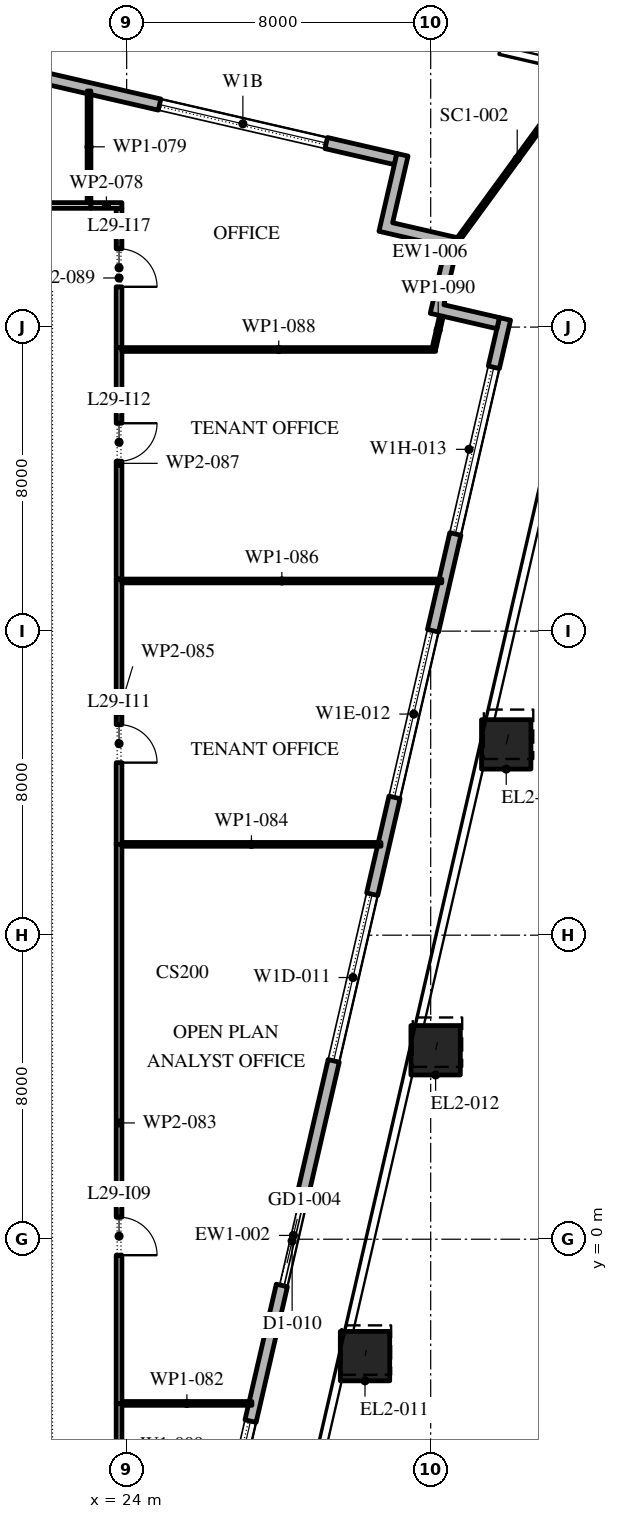
"""IFC4 building model, lengths in metres.
Left out: names, types, materials, properties, quantities, classifications, styles, units other than length and angle.
Written with IfcOpenShell. Run it as: python <this file> out.ifc"""

import sys

from ifc_helpers import new_model, si_unit, direction, frame, frame_2d, origin, origin_2d, place, context, subcontext, project, spatial, polyline, rectangle, outline, extrude, element, fill, save


model = new_model("IFC4")
c1 = context("Model", 3, precision=1e-05, world=origin(), true_north=direction((0.0, 1.0)))
c2 = subcontext(c1, "Body", "Model", "MODEL_VIEW")
j1 = project(units=[si_unit("LENGTHUNIT", "METRE"), si_unit("PLANEANGLEUNIT", "RADIAN")], contexts=[c1])
p1 = place(None, origin())
s1 = spatial("IfcSite", under=j1, at=p1, CompositionType="ELEMENT")
p2 = place(p1, origin())
s2 = spatial("IfcBuilding", under=s1, at=p2, CompositionType="ELEMENT")
p3 = place(p2, frame((0.0, 0.0, 135.0)))
s3 = spatial("IfcBuildingStorey", under=s2, at=p3, CompositionType="ELEMENT", Elevation=135.0)
p4 = place(p3, frame((30.272, -3.076, 0.0), z_axis=(0.008770884695, 0.037929719907, 0.99924191662), x_axis=(-0.974290512438, 0.225295355862, 0.0)))
e1 = element("IfcColumn", 1, at=p4, inside=s3, PredefinedType="COLUMN", context=c2, shape_type="SweptSolid", body=[
    extrude(rectangle(XDim=1.3, YDim=1.3, at=origin_2d()), origin(), (0.0, 0.0, 1.0), 4.203),
])
p5 = place(p3, frame((32.13, 4.972, 0.0), z_axis=(0.011668267153, 0.050562490995, 0.998652735462), x_axis=(-0.974391195695, 0.224859506699, 0.0)))
e2 = element("IfcColumn", 2, at=p5, inside=s3, PredefinedType="COLUMN", context=c2, shape_type="SweptSolid", body=[
    extrude(rectangle(XDim=1.3, YDim=1.3, at=origin_2d()), origin(), (0.0, 0.0, 1.0), 4.206),
])
p6 = place(p3, frame((33.988, 13.02, 0.0), z_axis=(0.014617836866, 0.063111930596, 0.997899395261), x_axis=(-0.974209784844, 0.225644178107, 0.0)))
e3 = element("IfcColumn", 3, at=p6, inside=s3, PredefinedType="COLUMN", context=c2, shape_type="SweptSolid", body=[
    extrude(rectangle(XDim=1.3, YDim=1.3, at=origin_2d()), origin(), (0.0, 0.0, 1.0), 4.209),
])
p7 = place(p3, frame((22.82, -24.016, 0.0), z_axis=(0.0, 0.0, 1.0), x_axis=(0.224953880882, 0.974369412223, 0.0)))
e4 = element("IfcWall", 4, at=p7, inside=s3, PredefinedType="STANDARD", context=c2, shape_type="SweptSolid", body=[
    extrude(rectangle(XDim=49.5, YDim=0.3, at=frame_2d((24.75, 0.0))), origin(), (0.0, 0.0, 1.0), 4.0),
])
p8 = place(p7, frame((1.157, 0.0, 0.45)))
e5 = element("IfcOpeningElement", 5, at=p8, cuts=e4, PredefinedType="OPENING", context=c2, shape_type="SweptSolid", body=[
    extrude(rectangle(XDim=4.5, YDim=3.05, at=frame_2d((2.25, 1.525))), frame((0.0, 0.16, 0.0), z_axis=(0.0, -1.0, 0.0), x_axis=(1.0, 0.0, 0.0)), (0.0, 0.0, 1.0), 0.32),
])
p9 = place(p7, frame((8.121, 0.0, 0.45)))
e6 = element("IfcOpeningElement", 6, at=p9, cuts=e4, PredefinedType="OPENING", context=c2, shape_type="SweptSolid", body=[
    extrude(rectangle(XDim=4.5, YDim=3.05, at=frame_2d((2.25, 1.525))), frame((0.0, 0.16, 0.0), z_axis=(0.0, -1.0, 0.0), x_axis=(1.0, 0.0, 0.0)), (0.0, 0.0, 1.0), 0.32),
])
p10 = place(p7, frame((15.236, 0.0, 0.45)))
e7 = element("IfcOpeningElement", 7, at=p10, cuts=e4, PredefinedType="OPENING", context=c2, shape_type="SweptSolid", body=[
    extrude(rectangle(XDim=4.5, YDim=3.05, at=frame_2d((2.25, 1.525))), frame((0.0, 0.16, 0.0), z_axis=(0.0, -1.0, 0.0), x_axis=(1.0, 0.0, 0.0)), (0.0, 0.0, 1.0), 0.32),
])
p11 = place(p7, frame((23.4, 0.0, 0.0)))
e8 = element("IfcOpeningElement", 8, at=p11, cuts=e4, PredefinedType="OPENING", context=c2, shape_type="SweptSolid", body=[
    extrude(rectangle(XDim=2.4, YDim=3.5, at=frame_2d((1.2, 1.75))), frame((0.0, 0.16, 0.0), z_axis=(0.0, -1.0, 0.0), x_axis=(1.0, 0.0, 0.0)), (0.0, 0.0, 1.0), 0.32),
])
p12 = place(p7, frame((29.464, 0.0, 0.45)))
e9 = element("IfcOpeningElement", 9, at=p12, cuts=e4, PredefinedType="OPENING", context=c2, shape_type="SweptSolid", body=[
    extrude(rectangle(XDim=4.5, YDim=2.875, at=frame_2d((2.25, 1.438))), frame((0.0, 0.16, 0.0), z_axis=(0.0, -1.0, 0.0), x_axis=(1.0, 0.0, 0.0)), (0.0, 0.0, 1.0), 0.32),
])
p13 = place(p7, frame((36.579, 0.0, 0.45)))
e10 = element("IfcOpeningElement", 10, at=p13, cuts=e4, PredefinedType="OPENING", context=c2, shape_type="SweptSolid", body=[
    extrude(rectangle(XDim=4.5, YDim=2.825, at=frame_2d((2.25, 1.413))), frame((0.0, 0.16, 0.0), z_axis=(0.0, -1.0, 0.0), x_axis=(1.0, 0.0, 0.0)), (0.0, 0.0, 1.0), 0.32),
])
p14 = place(p7, frame((43.693, 0.0, 0.45)))
e11 = element("IfcOpeningElement", 11, at=p14, cuts=e4, PredefinedType="OPENING", context=c2, shape_type="SweptSolid", body=[
    extrude(rectangle(XDim=4.5, YDim=2.75, at=frame_2d((2.25, 1.375))), frame((0.0, 0.16, 0.0), z_axis=(0.0, -1.0, 0.0), x_axis=(1.0, 0.0, 0.0)), (0.0, 0.0, 1.0), 0.32),
])
p15 = place(p3, frame((31.078, 28.421, 0.0), z_axis=(0.0, 0.0, 1.0), x_axis=(-0.974370456532, 0.224949357493, 0.0)))
e12 = element("IfcWall", 12, at=p15, inside=s3, PredefinedType="STANDARD", context=c2, shape_type="SweptSolid", body=[
    extrude(rectangle(XDim=51.0, YDim=0.3, at=frame_2d((25.5, 0.0))), origin(), (0.0, 0.0, 1.0), 4.0),
])
p16 = place(p15, frame((1.875, 0.0, 0.45)))
e13 = element("IfcOpeningElement", 13, at=p16, cuts=e12, PredefinedType="OPENING", context=c2, shape_type="SweptSolid", body=[
    extrude(rectangle(XDim=4.5, YDim=2.95, at=frame_2d((2.25, 1.475))), frame((0.0, 0.16, 0.0), z_axis=(0.0, -1.0, 0.0), x_axis=(1.0, 0.0, 0.0)), (0.0, 0.0, 1.0), 0.32),
])
p17 = place(p15, frame((10.275, 0.0, 0.45)))
e14 = element("IfcOpeningElement", 14, at=p17, cuts=e12, PredefinedType="OPENING", context=c2, shape_type="SweptSolid", body=[
    extrude(rectangle(XDim=4.5, YDim=2.825, at=frame_2d((2.25, 1.413))), frame((0.0, 0.16, 0.0), z_axis=(0.0, -1.0, 0.0), x_axis=(1.0, 0.0, 0.0)), (0.0, 0.0, 1.0), 0.32),
])
p18 = place(p15, frame((18.825, 0.0, 0.45)))
e15 = element("IfcOpeningElement", 15, at=p18, cuts=e12, PredefinedType="OPENING", context=c2, shape_type="SweptSolid", body=[
    extrude(rectangle(XDim=4.5, YDim=2.75, at=frame_2d((2.25, 1.375))), frame((0.0, 0.16, 0.0), z_axis=(0.0, -1.0, 0.0), x_axis=(1.0, 0.0, 0.0)), (0.0, 0.0, 1.0), 0.32),
])
p19 = place(p15, frame((27.075, 0.0, 0.0)))
e16 = element("IfcOpeningElement", 16, at=p19, cuts=e12, PredefinedType="OPENING", context=c2, shape_type="SweptSolid", body=[
    extrude(rectangle(XDim=2.4, YDim=3.125, at=frame_2d((1.2, 1.562))), frame((0.0, 0.16, 0.0), z_axis=(0.0, -1.0, 0.0), x_axis=(1.0, 0.0, 0.0)), (0.0, 0.0, 1.0), 0.32),
])
p20 = place(p15, frame((35.925, 0.0, 0.45)))
e17 = element("IfcOpeningElement", 17, at=p20, cuts=e12, PredefinedType="OPENING", context=c2, shape_type="SweptSolid", body=[
    extrude(rectangle(XDim=4.5, YDim=2.575, at=frame_2d((2.25, 1.288))), frame((0.0, 0.16, 0.0), z_axis=(0.0, -1.0, 0.0), x_axis=(1.0, 0.0, 0.0)), (0.0, 0.0, 1.0), 0.32),
])
p21 = place(p15, frame((44.475, 0.0, 0.45)))
e18 = element("IfcOpeningElement", 18, at=p21, cuts=e12, PredefinedType="OPENING", context=c2, shape_type="SweptSolid", body=[
    extrude(rectangle(XDim=4.5, YDim=2.45, at=frame_2d((2.25, 1.225))), frame((0.0, 0.16, 0.0), z_axis=(0.0, -1.0, 0.0), x_axis=(1.0, 0.0, 0.0)), (0.0, 0.0, 1.0), 0.32),
])
p22 = place(p3, origin())
e19 = element("IfcWall", 19, at=p22, inside=s3, PredefinedType="STANDARD", context=c2, shape_type="SweptSolid", body=[
    extrude(outline(polyline([(32.393, 26.116), (30.639, 26.521), (31.111, 28.567), (31.404, 28.5), (30.999, 26.746), (32.753, 26.341), (32.348, 24.587), (33.809, 24.25), (33.742, 23.957), (31.988, 24.362), (32.393, 26.116)])), origin(), (0.0, 0.0, 1.0), 4.0),
])
p23 = place(p3, frame((32.753, 26.341, -0.05), z_axis=(0.0, 0.0, 1.0), x_axis=(0.58961396776, 0.807685191781, 0.0)))
e20 = element("IfcWall", 20, at=p23, inside=s3, PredefinedType="STANDARD", context=c2, shape_type="SweptSolid", body=[
    extrude(rectangle(XDim=5.17, YDim=0.1, at=frame_2d((2.585, 0.0))), origin(), (0.0, 0.0, 1.0), 4.05),
])
p24 = place(p3, frame((10.27, 27.2, 0.0), z_axis=(0.0, 0.0, 1.0), x_axis=(1.0, 0.0, 0.0)))
e21 = element("IfcWall", 21, at=p24, inside=s3, PredefinedType="PARTITIONING", context=c2, shape_type="SweptSolid", body=[
    extrude(rectangle(XDim=12.79, YDim=0.15, at=frame_2d((6.395, 0.0))), origin(), (0.0, 0.0, 1.0), 4.0),
])
p25 = place(p24, frame((7.09, 0.0, 0.0)))
e22 = element("IfcOpeningElement", 22, at=p25, cuts=e21, PredefinedType="OPENING", context=c2, shape_type="SweptSolid", body=[
    extrude(rectangle(XDim=1.0, YDim=2.1, at=frame_2d((0.5, 1.05))), frame((0.0, 0.085, 0.0), z_axis=(0.0, -1.0, 0.0), x_axis=(1.0, 0.0, 0.0)), (0.0, 0.0, 1.0), 0.17),
])
p26 = place(p3, frame((23.06, 27.2, 0.0), z_axis=(0.0, 0.0, 1.0), x_axis=(1.0, 0.0, 0.0)))
e23 = element("IfcWall", 23, at=p26, inside=s3, PredefinedType="PARTITIONING", context=c2, shape_type="SweptSolid", body=[
    extrude(rectangle(XDim=0.815, YDim=0.15, at=frame_2d((0.407, 0.0))), origin(), (0.0, 0.0, 1.0), 4.0),
])
p27 = place(p3, frame((23.01, 30.212, 0.0), z_axis=(0.0, 0.0, 1.0), x_axis=(0.0, -1.0, 0.0)))
e24 = element("IfcWall", 24, at=p27, inside=s3, PredefinedType="PARTITIONING", context=c2, shape_type="SweptSolid", body=[
    extrude(rectangle(XDim=2.937, YDim=0.1, at=frame_2d((1.469, 0.0))), origin(), (0.0, 0.0, 1.0), 4.0),
])
p28 = place(p3, frame((23.8, -4.32, 0.0), z_axis=(0.0, 0.0, 1.0), x_axis=(0.0, -1.0, 0.0)))
e25 = element("IfcWall", 25, at=p28, inside=s3, PredefinedType="PARTITIONING", context=c2, shape_type="SweptSolid", body=[
    extrude(rectangle(XDim=3.105, YDim=0.15, at=frame_2d((1.552, 0.0))), origin(), (0.0, 0.0, 1.0), 4.0),
])
p29 = place(p28, frame((1.53, 0.0, 0.0)))
e26 = element("IfcOpeningElement", 26, at=p29, cuts=e25, PredefinedType="OPENING", context=c2, shape_type="SweptSolid", body=[
    extrude(rectangle(XDim=1.0, YDim=2.1, at=frame_2d((0.5, 1.05))), frame((0.0, 0.085, 0.0), z_axis=(0.0, -1.0, 0.0), x_axis=(1.0, 0.0, 0.0)), (0.0, 0.0, 1.0), 0.17),
])
p30 = place(p3, frame((23.875, -4.32, 0.0), z_axis=(0.0, 0.0, 1.0), x_axis=(1.0, 0.0, 0.0)))
e27 = element("IfcWall", 27, at=p30, inside=s3, PredefinedType="PARTITIONING", context=c2, shape_type="SweptSolid", body=[
    extrude(rectangle(XDim=3.421, YDim=0.1, at=frame_2d((1.71, 0.0))), origin(), (0.0, 0.0, 1.0), 4.0),
])
p31 = place(p3, frame((23.8, 10.44, 0.0), z_axis=(0.0, 0.0, 1.0), x_axis=(0.0, -1.0, 0.0)))
e28 = element("IfcWall", 28, at=p31, inside=s3, PredefinedType="PARTITIONING", context=c2, shape_type="SweptSolid", body=[
    extrude(rectangle(XDim=14.76, YDim=0.15, at=frame_2d((7.38, 0.0))), origin(), (0.0, 0.0, 1.0), 4.0),
])
p32 = place(p31, frame((9.86, 0.0, 0.0)))
e29 = element("IfcOpeningElement", 29, at=p32, cuts=e28, PredefinedType="OPENING", context=c2, shape_type="SweptSolid", body=[
    extrude(rectangle(XDim=1.0, YDim=2.1, at=frame_2d((0.5, 1.05))), frame((0.0, 0.085, 0.0), z_axis=(0.0, -1.0, 0.0), x_axis=(1.0, 0.0, 0.0)), (0.0, 0.0, 1.0), 0.17),
])
p33 = place(p3, frame((23.875, 10.39, 0.0), z_axis=(0.0, 0.0, 1.0), x_axis=(1.0, 0.0, 0.0)))
e30 = element("IfcWall", 30, at=p33, inside=s3, PredefinedType="PARTITIONING", context=c2, shape_type="SweptSolid", body=[
    extrude(rectangle(XDim=6.817, YDim=0.1, at=frame_2d((3.408, 0.0))), origin(), (0.0, 0.0, 1.0), 4.0),
])
p34 = place(p3, frame((23.8, 17.37, 0.0), z_axis=(0.0, 0.0, 1.0), x_axis=(0.0, -1.0, 0.0)))
e31 = element("IfcWall", 31, at=p34, inside=s3, PredefinedType="PARTITIONING", context=c2, shape_type="SweptSolid", body=[
    extrude(rectangle(XDim=6.98, YDim=0.15, at=frame_2d((3.49, 0.0))), origin(), (0.0, 0.0, 1.0), 4.0),
])
p35 = place(p34, frame((3.83, 0.0, 0.0)))
e32 = element("IfcOpeningElement", 32, at=p35, cuts=e31, PredefinedType="OPENING", context=c2, shape_type="SweptSolid", body=[
    extrude(rectangle(XDim=1.0, YDim=2.1, at=frame_2d((0.5, 1.05))), frame((0.0, 0.085, 0.0), z_axis=(0.0, -1.0, 0.0), x_axis=(1.0, 0.0, 0.0)), (0.0, 0.0, 1.0), 0.17),
])
p36 = place(p3, frame((23.875, 17.32, 0.0), z_axis=(0.0, 0.0, 1.0), x_axis=(1.0, 0.0, 0.0)))
e33 = element("IfcWall", 33, at=p36, inside=s3, PredefinedType="PARTITIONING", context=c2, shape_type="SweptSolid", body=[
    extrude(rectangle(XDim=8.417, YDim=0.1, at=frame_2d((4.208, 0.0))), origin(), (0.0, 0.0, 1.0), 4.0),
])
p37 = place(p3, frame((23.8, 23.46, 0.0), z_axis=(0.0, 0.0, 1.0), x_axis=(0.0, -1.0, 0.0)))
e34 = element("IfcWall", 34, at=p37, inside=s3, PredefinedType="PARTITIONING", context=c2, shape_type="SweptSolid", body=[
    extrude(rectangle(XDim=6.09, YDim=0.15, at=frame_2d((3.045, 0.0))), origin(), (0.0, 0.0, 1.0), 4.0),
])
p38 = place(p37, frame((1.99, 0.0, 0.0)))
e35 = element("IfcOpeningElement", 35, at=p38, cuts=e34, PredefinedType="OPENING", context=c2, shape_type="SweptSolid", body=[
    extrude(rectangle(XDim=1.0, YDim=2.1, at=frame_2d((0.5, 1.05))), frame((0.0, 0.085, 0.0), z_axis=(0.0, -1.0, 0.0), x_axis=(1.0, 0.0, 0.0)), (0.0, 0.0, 1.0), 0.17),
])
p39 = place(p3, frame((23.875, 23.41, 0.0), z_axis=(0.0, 0.0, 1.0), x_axis=(1.0, 0.0, 0.0)))
e36 = element("IfcWall", 36, at=p39, inside=s3, PredefinedType="PARTITIONING", context=c2, shape_type="SweptSolid", body=[
    extrude(rectangle(XDim=8.255, YDim=0.1, at=frame_2d((4.127, 0.0))), origin(), (0.0, 0.0, 1.0), 4.0),
])
p40 = place(p3, frame((23.8, 27.125, 0.0), z_axis=(0.0, 0.0, 1.0), x_axis=(0.0, -1.0, 0.0)))
e37 = element("IfcWall", 37, at=p40, inside=s3, PredefinedType="PARTITIONING", context=c2, shape_type="SweptSolid", body=[
    extrude(rectangle(XDim=3.665, YDim=0.15, at=frame_2d((1.833, 0.0))), origin(), (0.0, 0.0, 1.0), 4.0),
])
p41 = place(p40, frame((1.065, 0.0, 0.0)))
e38 = element("IfcOpeningElement", 38, at=p41, cuts=e37, PredefinedType="OPENING", context=c2, shape_type="SweptSolid", body=[
    extrude(rectangle(XDim=1.0, YDim=2.1, at=frame_2d((0.5, 1.05))), frame((0.0, 0.085, 0.0), z_axis=(0.0, -1.0, 0.0), x_axis=(1.0, 0.0, 0.0)), (0.0, 0.0, 1.0), 0.17),
])
p42 = place(p3, frame((32.091, 23.459, 0.0), z_axis=(0.0, 0.0, 1.0), x_axis=(0.223406444343, 0.97472537703, 0.0)))
e39 = element("IfcWall", 39, at=p42, inside=s3, PredefinedType="PARTITIONING", context=c2, shape_type="SweptSolid", body=[
    extrude(rectangle(XDim=0.957, YDim=0.1, at=frame_2d((0.479, 0.0))), origin(), (0.0, 0.0, 1.0), 4.0),
])
p43 = place(p10, origin())
e40 = element("IfcWindow", 40, at=p43, inside=s3, PartitioningType="DOUBLE_PANEL_VERTICAL", PredefinedType="WINDOW", context=c2, shape_type="SweptSolid", body=[
    extrude(rectangle(XDim=4.5, YDim=3.05, at=frame_2d((2.25, 1.525))), frame((0.0, 0.03, 0.0), z_axis=(0.0, -1.0, 0.0), x_axis=(1.0, 0.0, 0.0)), (0.0, 0.0, 1.0), 0.06),
])
fill(e7, e40)
p44 = place(p11, origin())
e41 = element("IfcDoor", 41, at=p44, inside=s3, OperationType="DOUBLE_DOOR_SLIDING", PredefinedType="DOOR", context=c2, shape_type="SweptSolid", body=[
    extrude(rectangle(XDim=2.4, YDim=3.5, at=frame_2d((1.2, 1.75))), frame((0.0, 0.025, 0.0), z_axis=(0.0, -1.0, 0.0), x_axis=(1.0, 0.0, 0.0)), (0.0, 0.0, 1.0), 0.05),
])
fill(e8, e41)
p45 = place(p12, origin())
e42 = element("IfcWindow", 42, at=p45, inside=s3, PartitioningType="DOUBLE_PANEL_VERTICAL", PredefinedType="WINDOW", context=c2, shape_type="SweptSolid", body=[
    extrude(rectangle(XDim=4.5, YDim=2.875, at=frame_2d((2.25, 1.438))), frame((0.0, 0.03, 0.0), z_axis=(0.0, -1.0, 0.0), x_axis=(1.0, 0.0, 0.0)), (0.0, 0.0, 1.0), 0.06),
])
fill(e9, e42)
p46 = place(p13, origin())
e43 = element("IfcWindow", 43, at=p46, inside=s3, PartitioningType="DOUBLE_PANEL_VERTICAL", PredefinedType="WINDOW", context=c2, shape_type="SweptSolid", body=[
    extrude(rectangle(XDim=4.5, YDim=2.825, at=frame_2d((2.25, 1.413))), frame((0.0, 0.03, 0.0), z_axis=(0.0, -1.0, 0.0), x_axis=(1.0, 0.0, 0.0)), (0.0, 0.0, 1.0), 0.06),
])
fill(e10, e43)
p47 = place(p14, origin())
e44 = element("IfcWindow", 44, at=p47, inside=s3, PartitioningType="DOUBLE_PANEL_VERTICAL", PredefinedType="WINDOW", context=c2, shape_type="SweptSolid", body=[
    extrude(rectangle(XDim=4.5, YDim=2.75, at=frame_2d((2.25, 1.375))), frame((0.0, 0.03, 0.0), z_axis=(0.0, -1.0, 0.0), x_axis=(1.0, 0.0, 0.0)), (0.0, 0.0, 1.0), 0.06),
])
fill(e11, e44)
p48 = place(p16, origin())
e45 = element("IfcWindow", 45, at=p48, inside=s3, PartitioningType="DOUBLE_PANEL_VERTICAL", PredefinedType="WINDOW", context=c2, shape_type="SweptSolid", body=[
    extrude(rectangle(XDim=4.5, YDim=2.95, at=frame_2d((2.25, 1.475))), frame((0.0, 0.03, 0.0), z_axis=(0.0, -1.0, 0.0), x_axis=(1.0, 0.0, 0.0)), (0.0, 0.0, 1.0), 0.06),
])
fill(e13, e45)
p49 = place(p32, origin())
e46 = element("IfcDoor", 46, at=p49, inside=s3, OperationType="SINGLE_SWING_LEFT", PredefinedType="DOOR", context=c2, shape_type="SweptSolid", body=[
    extrude(rectangle(XDim=1.0, YDim=2.1, at=frame_2d((0.5, 1.05))), frame((0.0, 0.025, 0.0), z_axis=(0.0, -1.0, 0.0), x_axis=(1.0, 0.0, 0.0)), (0.0, 0.0, 1.0), 0.05),
])
fill(e29, e46)
p50 = place(p35, origin())
e47 = element("IfcDoor", 47, at=p50, inside=s3, OperationType="SINGLE_SWING_LEFT", PredefinedType="DOOR", context=c2, shape_type="SweptSolid", body=[
    extrude(rectangle(XDim=1.0, YDim=2.1, at=frame_2d((0.5, 1.05))), frame((0.0, 0.025, 0.0), z_axis=(0.0, -1.0, 0.0), x_axis=(1.0, 0.0, 0.0)), (0.0, 0.0, 1.0), 0.05),
])
fill(e32, e47)
p51 = place(p38, origin())
e48 = element("IfcDoor", 48, at=p51, inside=s3, OperationType="SINGLE_SWING_RIGHT", PredefinedType="DOOR", context=c2, shape_type="SweptSolid", body=[
    extrude(rectangle(XDim=1.0, YDim=2.1, at=frame_2d((0.5, 1.05))), frame((0.0, 0.025, 0.0), z_axis=(0.0, -1.0, 0.0), x_axis=(1.0, 0.0, 0.0)), (0.0, 0.0, 1.0), 0.05),
])
fill(e35, e48)
p52 = place(p41, origin())
e49 = element("IfcDoor", 49, at=p52, inside=s3, OperationType="SINGLE_SWING_LEFT", PredefinedType="DOOR", context=c2, shape_type="SweptSolid", body=[
    extrude(rectangle(XDim=1.0, YDim=2.1, at=frame_2d((0.5, 1.05))), frame((0.0, 0.025, 0.0), z_axis=(0.0, -1.0, 0.0), x_axis=(1.0, 0.0, 0.0)), (0.0, 0.0, 1.0), 0.05),
])
fill(e38, e49)
save(model, sys.argv[1])
